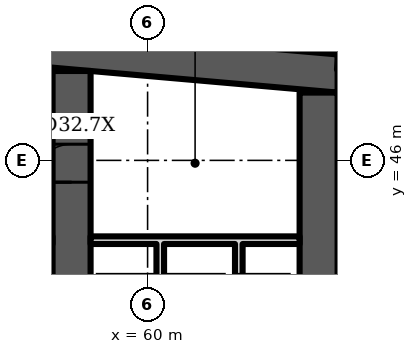
"""IFC4 building model, lengths in metres.
Left out: names, types, materials, properties, quantities, classifications, styles, units other than length and angle.
Written with IfcOpenShell. Run it as: python <this file> out.ifc"""

import sys

from ifc_helpers import new_model, si_unit, direction, frame, frame_2d, origin, place, context, subcontext, project, spatial, polyline, rectangle, outline, extrude, element, fill, save


model = new_model("IFC4")
c1 = context("Model", 3, precision=1e-05, world=origin(), true_north=direction((0.0, 1.0)))
c2 = subcontext(c1, "Body", "Model", "MODEL_VIEW")
j1 = project(units=[si_unit("LENGTHUNIT", "METRE"), si_unit("PLANEANGLEUNIT", "RADIAN")], contexts=[c1])
p1 = place(None, origin())
s1 = spatial("IfcSite", under=j1, at=p1, CompositionType="ELEMENT")
p2 = place(p1, origin())
s2 = spatial("IfcBuilding", under=s1, at=p2, CompositionType="ELEMENT")
p3 = place(p2, frame((0.0, 0.0, 136.3)))
s3 = spatial("IfcBuildingStorey", under=s2, at=p3, CompositionType="ELEMENT", Elevation=136.3)
p4 = place(p3, frame((0.0, 0.0, -0.0)))
e1 = element("IfcWall", 1, at=p4, inside=s3, PredefinedType="SHEAR", context=c2, shape_type="SweptSolid", body=[
    extrude(outline(polyline([(16.0, 47.784), (40.5, 49.927), (65.0, 47.784), (65.0, 48.787), (40.5, 50.931), (16.0, 48.787), (16.0, 47.784)])), origin(), (0.0, 0.0, 1.0), 3.6),
])
p5 = place(p3, frame((58.0, 35.0, 0.0), z_axis=(0.0, 0.0, 1.0), x_axis=(0.0, 1.0, 0.0)))
e2 = element("IfcWall", 2, at=p5, inside=s3, PredefinedType="SHEAR", context=c2, shape_type="SweptSolid", body=[
    extrude(rectangle(XDim=13.352, YDim=1.0, at=frame_2d((6.676, 0.0))), origin(), (0.0, 0.0, 1.0), 3.6),
])
p6 = place(p5, frame((10.426, 0.0, 0.0)))
e3 = element("IfcOpeningElement", 3, at=p6, cuts=e2, PredefinedType="OPENING", context=c2, shape_type="SweptSolid", body=[
    extrude(rectangle(XDim=1.0, YDim=2.1, at=frame_2d((0.5, 1.05))), frame((0.0, 0.51, 0.0), z_axis=(0.0, -1.0, 0.0), x_axis=(1.0, 0.0, 0.0)), (0.0, 0.0, 1.0), 1.02),
])
p7 = place(p5, frame((3.4, 0.0, 0.0)))
e4 = element("IfcOpeningElement", 4, at=p7, cuts=e2, PredefinedType="OPENING", context=c2, shape_type="SweptSolid", body=[
    extrude(rectangle(XDim=1.1, YDim=2.1, at=frame_2d((0.55, 1.05))), frame((0.0, 0.51, 0.0), z_axis=(0.0, -1.0, 0.0), x_axis=(1.0, 0.0, 0.0)), (0.0, 0.0, 1.0), 1.02),
])
p8 = place(p3, frame((64.5, 35.0, 0.0), z_axis=(0.0, 0.0, 1.0), x_axis=(0.0, 1.0, 0.0)))
e5 = element("IfcWall", 5, at=p8, inside=s3, PredefinedType="SHEAR", context=c2, shape_type="SweptSolid", body=[
    extrude(rectangle(XDim=12.784, YDim=1.0, at=frame_2d((6.392, 0.0))), origin(), (0.0, 0.0, 1.0), 3.6),
])
p9 = place(p3, frame((67.983, 48.326, 0.0), z_axis=(0.0, 0.0, 1.0), x_axis=(-0.996194, 0.087168, 0.0)))
e6 = element("IfcWall", 6, at=p9, inside=s3, PredefinedType="SOLIDWALL", context=c2, shape_type="SweptSolid", body=[
    extrude(rectangle(XDim=2.994, YDim=0.4, at=frame_2d((1.497, 0.0))), origin(), (0.0, 0.0, 1.0), 3.2),
])
p10 = place(p3, frame((0.0, 0.0, -0.0)))
e7 = element("IfcWall", 7, at=p10, inside=s3, PredefinedType="PARTITIONING", context=c2, shape_type="SweptSolid", body=[
    extrude(outline(polyline([(60.433, 40.8), (60.233, 40.8), (60.233, 43.8), (58.5, 43.8), (58.5, 44.0), (64.0, 44.0), (64.0, 43.8), (62.5, 43.8), (62.5, 40.8), (62.3, 40.8), (62.3, 43.8), (60.433, 43.8), (60.433, 40.8)])), origin(), (0.0, 0.0, 1.0), 3.2),
])
p11 = place(p6, origin())
e8 = element("IfcDoor", 8, at=p11, inside=s3, OperationType="SINGLE_SWING_LEFT", PredefinedType="DOOR", context=c2, shape_type="SweptSolid", body=[
    extrude(rectangle(XDim=1.0, YDim=2.1, at=frame_2d((0.5, 1.05))), frame((0.0, 0.5, 0.0), z_axis=(0.0, -1.0, 0.0), x_axis=(1.0, 0.0, 0.0)), (0.0, 0.0, 1.0), 1.0),
])
fill(e3, e8)
save(model, sys.argv[1])
